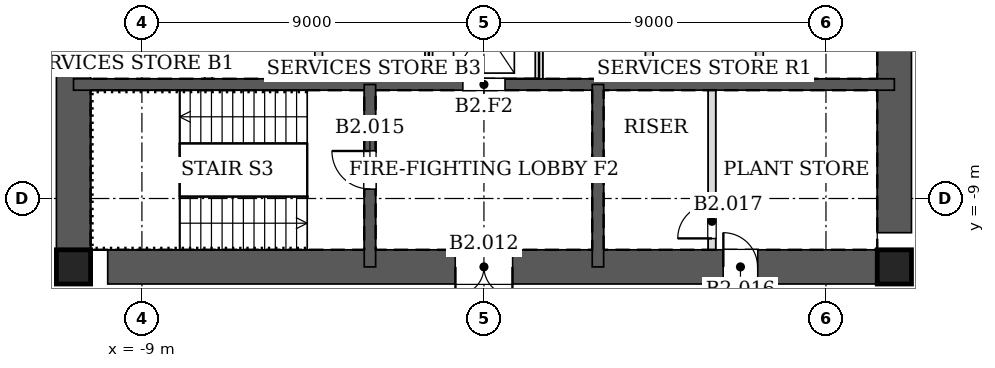
"""IFC4 building model, lengths in metres.
Left out: names, types, materials, properties, quantities, classifications, styles, units other than length and angle.
Written with IfcOpenShell. Run it as: python <this file> out.ifc"""

import sys

from ifc_helpers import new_model, si_unit, direction, frame, frame_2d, origin, origin_2d, place, context, subcontext, project, spatial, rectangle, hollow_rectangle, extrude, element, fill, save


model = new_model("IFC4")
c1 = context("Model", 3, precision=1e-05, world=origin(), true_north=direction((0.0, 1.0)))
c2 = subcontext(c1, "Body", "Model", "MODEL_VIEW")
j1 = project(units=[si_unit("LENGTHUNIT", "METRE"), si_unit("PLANEANGLEUNIT", "RADIAN")], contexts=[c1])
p1 = place(None, origin())
s1 = spatial("IfcSite", under=j1, at=p1, CompositionType="ELEMENT")
p2 = place(p1, origin())
s2 = spatial("IfcBuilding", under=s1, at=p2, CompositionType="ELEMENT")
p3 = place(p2, frame((0.0, 0.0, -9.0)))
s3 = spatial("IfcBuildingStorey", under=s2, at=p3, CompositionType="ELEMENT", Elevation=-9.0)
for number, where, z_axis, x_axis in (
    (1, (-10.8, -10.8, -0.35), (0.0, 0.0, 1.0), (1.0, 0.0, 0.0)),
    (2, (10.8, -10.8, -0.35), (0.0, 0.0, 1.0), (1.0, 0.0, 0.0)),
):
    element("IfcColumn", number, at=place(p3, frame(where, z_axis=z_axis, x_axis=x_axis)), inside=s3, PredefinedType="COLUMN", context=c2, shape_type="SweptSolid", body=[
        extrude(hollow_rectangle(XDim=0.9, YDim=0.9, WallThickness=0.06, at=origin_2d()), origin(), (0.0, 0.0, 1.0), 4.85),
    ])
p4 = place(p3, frame((-10.8, -10.8, -0.35), z_axis=(0.0, 0.0, 1.0), x_axis=(1.0, 0.0, 0.0)))
e3 = element("IfcWall", 3, at=p4, inside=s3, PredefinedType="SOLIDWALL", context=c2, shape_type="SweptSolid", body=[
    extrude(rectangle(XDim=21.6, YDim=0.9, at=frame_2d((10.8, 0.0))), origin(), (0.0, 0.0, 1.0), 4.85),
])
p5 = place(p4, frame((10.05, 0.0, 0.35)))
e4 = element("IfcOpeningElement", 4, at=p5, cuts=e3, PredefinedType="OPENING", context=c2, shape_type="SweptSolid", body=[
    extrude(rectangle(XDim=1.5, YDim=2.1, at=frame_2d((0.75, 1.05))), frame((0.0, 0.46, 0.0), z_axis=(0.0, -1.0, 0.0), x_axis=(1.0, 0.0, 0.0)), (0.0, 0.0, 1.0), 0.92),
])
p6 = place(p4, frame((17.1, 0.0, 0.35)))
e5 = element("IfcOpeningElement", 5, at=p6, cuts=e3, PredefinedType="OPENING", context=c2, shape_type="SweptSolid", body=[
    extrude(rectangle(XDim=0.9, YDim=2.1, at=frame_2d((0.45, 1.05))), frame((0.0, 0.46, 0.0), z_axis=(0.0, -1.0, 0.0), x_axis=(1.0, 0.0, 0.0)), (0.0, 0.0, 1.0), 0.92),
])
p7 = place(p3, frame((10.8, -10.8, -0.35), z_axis=(0.0, 0.0, 1.0), x_axis=(0.0, 1.0, 0.0)))
e6 = element("IfcWall", 6, at=p7, inside=s3, PredefinedType="SOLIDWALL", context=c2, shape_type="SweptSolid", body=[
    extrude(rectangle(XDim=21.6, YDim=0.9, at=frame_2d((10.8, 0.0))), origin(), (0.0, 0.0, 1.0), 4.85),
])
p8 = place(p7, frame((11.7, 0.0, 0.35)))
e7 = element("IfcOpeningElement", 7, at=p8, cuts=e6, PredefinedType="OPENING", context=c2, shape_type="SweptSolid", body=[
    extrude(rectangle(XDim=1.2, YDim=2.1, at=frame_2d((0.6, 1.05))), frame((0.0, 0.46, 0.0), z_axis=(0.0, -1.0, 0.0), x_axis=(1.0, 0.0, 0.0)), (0.0, 0.0, 1.0), 0.92),
])
p9 = place(p7, frame((8.7, 0.0, 0.35)))
e8 = element("IfcOpeningElement", 8, at=p9, cuts=e6, PredefinedType="OPENING", context=c2, shape_type="SweptSolid", body=[
    extrude(rectangle(XDim=1.2, YDim=2.1, at=frame_2d((0.6, 1.05))), frame((0.0, 0.46, 0.0), z_axis=(0.0, -1.0, 0.0), x_axis=(1.0, 0.0, 0.0)), (0.0, 0.0, 1.0), 0.92),
])
p10 = place(p3, frame((-10.8, 10.8, -0.35), z_axis=(0.0, 0.0, 1.0), x_axis=(0.0, -1.0, 0.0)))
e9 = element("IfcWall", 9, at=p10, inside=s3, PredefinedType="SOLIDWALL", context=c2, shape_type="SweptSolid", body=[
    extrude(rectangle(XDim=21.6, YDim=0.9, at=frame_2d((10.8, 0.0))), origin(), (0.0, 0.0, 1.0), 4.85),
])
p11 = place(p10, frame((8.7, 0.0, 0.35)))
e10 = element("IfcOpeningElement", 10, at=p11, cuts=e9, PredefinedType="OPENING", context=c2, shape_type="SweptSolid", body=[
    extrude(rectangle(XDim=1.2, YDim=2.1, at=frame_2d((0.6, 1.05))), frame((0.0, 0.46, 0.0), z_axis=(0.0, -1.0, 0.0), x_axis=(1.0, 0.0, 0.0)), (0.0, 0.0, 1.0), 0.92),
])
p12 = place(p10, frame((11.7, 0.0, 0.35)))
e11 = element("IfcOpeningElement", 11, at=p12, cuts=e9, PredefinedType="OPENING", context=c2, shape_type="SweptSolid", body=[
    extrude(rectangle(XDim=1.2, YDim=2.1, at=frame_2d((0.6, 1.05))), frame((0.0, 0.46, 0.0), z_axis=(0.0, -1.0, 0.0), x_axis=(1.0, 0.0, 0.0)), (0.0, 0.0, 1.0), 0.92),
])
p13 = place(p3, frame((-10.8, -6.0, -0.35), z_axis=(0.0, 0.0, 1.0), x_axis=(1.0, 0.0, 0.0)))
e12 = element("IfcWall", 12, at=p13, inside=s3, PredefinedType="SOLIDWALL", context=c2, shape_type="SweptSolid", body=[
    extrude(rectangle(XDim=21.6, YDim=0.3, at=frame_2d((10.8, 0.0))), origin(), (0.0, 0.0, 1.0), 4.85),
])
p14 = place(p13, frame((10.25, 0.0, 0.35)))
e13 = element("IfcOpeningElement", 13, at=p14, cuts=e12, PredefinedType="OPENING", context=c2, shape_type="SweptSolid", body=[
    extrude(rectangle(XDim=1.1, YDim=2.1, at=frame_2d((0.55, 1.05))), frame((0.0, 0.16, 0.0), z_axis=(0.0, -1.0, 0.0), x_axis=(1.0, 0.0, 0.0)), (0.0, 0.0, 1.0), 0.32),
])
p15 = place(p3, frame((-3.0, -6.0, -0.35), z_axis=(0.0, 0.0, 1.0), x_axis=(0.0, -1.0, 0.0)))
e14 = element("IfcWall", 14, at=p15, inside=s3, PredefinedType="SOLIDWALL", context=c2, shape_type="SweptSolid", body=[
    extrude(rectangle(XDim=4.8, YDim=0.3, at=frame_2d((2.4, 0.0))), origin(), (0.0, 0.0, 1.0), 4.85),
])
p16 = place(p15, frame((1.75, 0.0, 0.35)))
e15 = element("IfcOpeningElement", 15, at=p16, cuts=e14, PredefinedType="OPENING", context=c2, shape_type="SweptSolid", body=[
    extrude(rectangle(XDim=1.0, YDim=2.1, at=frame_2d((0.5, 1.05))), frame((0.0, 0.16, 0.0), z_axis=(0.0, -1.0, 0.0), x_axis=(1.0, 0.0, 0.0)), (0.0, 0.0, 1.0), 0.32),
])
p17 = place(p3, frame((3.0, -6.0, -0.35), z_axis=(0.0, 0.0, 1.0), x_axis=(0.0, -1.0, 0.0)))
e16 = element("IfcWall", 16, at=p17, inside=s3, PredefinedType="SOLIDWALL", context=c2, shape_type="SweptSolid", body=[
    extrude(rectangle(XDim=4.8, YDim=0.3, at=frame_2d((2.4, 0.0))), origin(), (0.0, 0.0, 1.0), 4.85),
])
for number, where, z_axis, x_axis in (
    (17, (-7.25, -5.85, 0.0), (0.0, 0.0, 1.0), (0.0, 1.0, 0.0)),
    (18, (-4.35, -5.85, 0.0), (0.0, 0.0, 1.0), (0.0, 1.0, 0.0)),
    (19, (-1.45, -5.85, 0.0), (0.0, 0.0, 1.0), (0.0, 1.0, 0.0)),
    (20, (1.45, -5.85, 0.0), (0.0, 0.0, 1.0), (0.0, 1.0, 0.0)),
    (21, (4.35, -5.85, 0.0), (0.0, 0.0, 1.0), (0.0, 1.0, 0.0)),
    (22, (7.25, -5.85, 0.0), (0.0, 0.0, 1.0), (0.0, 1.0, 0.0)),
):
    element("IfcWall", number, at=place(p3, frame(where, z_axis=z_axis, x_axis=x_axis)), inside=s3, PredefinedType="PARTITIONING", context=c2, shape_type="SweptSolid", body=[
        extrude(rectangle(XDim=2.7, YDim=0.2, at=frame_2d((1.35, 0.0))), origin(), (0.0, 0.0, 1.0), 4.2),
    ])
p18 = place(p3, frame((6.0, -10.35, 0.0), z_axis=(0.0, 0.0, 1.0), x_axis=(0.0, 1.0, 0.0)))
e23 = element("IfcWall", 23, at=p18, inside=s3, PredefinedType="PARTITIONING", context=c2, shape_type="SweptSolid", body=[
    extrude(rectangle(XDim=4.2, YDim=0.2, at=frame_2d((2.1, 0.0))), origin(), (0.0, 0.0, 1.0), 4.2),
])
p19 = place(p18, frame((0.3, 0.0, 0.0)))
e24 = element("IfcOpeningElement", 24, at=p19, cuts=e23, PredefinedType="OPENING", context=c2, shape_type="SweptSolid", body=[
    extrude(rectangle(XDim=0.9, YDim=2.1, at=frame_2d((0.45, 1.05))), frame((0.0, 0.11, 0.0), z_axis=(0.0, -1.0, 0.0), x_axis=(1.0, 0.0, 0.0)), (0.0, 0.0, 1.0), 0.22),
])
p20 = place(p5, frame((1.5, 0.0, 0.0), z_axis=(0.0, 0.0, 1.0), x_axis=(-1.0, 0.0, 0.0)))
e25 = element("IfcDoor", 25, at=p20, inside=s3, OperationType="DOUBLE_DOOR_SINGLE_SWING", PredefinedType="DOOR", context=c2, shape_type="SweptSolid", body=[
    extrude(rectangle(XDim=1.5, YDim=2.1, at=frame_2d((0.75, 1.05))), frame((0.0, 0.025, 0.0), z_axis=(0.0, -1.0, 0.0), x_axis=(1.0, 0.0, 0.0)), (0.0, 0.0, 1.0), 0.05),
])
fill(e4, e25)
p21 = place(p16, frame((1.0, 0.0, 0.0), z_axis=(0.0, 0.0, 1.0), x_axis=(-1.0, 0.0, 0.0)))
e26 = element("IfcDoor", 26, at=p21, inside=s3, OperationType="SINGLE_SWING_RIGHT", PredefinedType="DOOR", context=c2, shape_type="SweptSolid", body=[
    extrude(rectangle(XDim=1.0, YDim=2.1, at=frame_2d((0.5, 1.05))), frame((0.0, 0.025, 0.0), z_axis=(0.0, -1.0, 0.0), x_axis=(1.0, 0.0, 0.0)), (0.0, 0.0, 1.0), 0.05),
])
fill(e15, e26)
p22 = place(p6, origin())
e27 = element("IfcDoor", 27, at=p22, inside=s3, OperationType="SINGLE_SWING_LEFT", PredefinedType="DOOR", context=c2, shape_type="SweptSolid", body=[
    extrude(rectangle(XDim=0.9, YDim=2.1, at=frame_2d((0.45, 1.05))), frame((0.0, 0.025, 0.0), z_axis=(0.0, -1.0, 0.0), x_axis=(1.0, 0.0, 0.0)), (0.0, 0.0, 1.0), 0.05),
])
fill(e5, e27)
p23 = place(p19, origin())
e28 = element("IfcDoor", 28, at=p23, inside=s3, OperationType="SINGLE_SWING_LEFT", PredefinedType="DOOR", context=c2, shape_type="SweptSolid", body=[
    extrude(rectangle(XDim=0.9, YDim=2.1, at=frame_2d((0.45, 1.05))), frame((0.0, 0.025, 0.0), z_axis=(0.0, -1.0, 0.0), x_axis=(1.0, 0.0, 0.0)), (0.0, 0.0, 1.0), 0.05),
])
fill(e24, e28)
p24 = place(p14, origin())
e29 = element("IfcDoor", 29, at=p24, inside=s3, OperationType="DOUBLE_DOOR_SLIDING", PredefinedType="DOOR", context=c2, shape_type="SweptSolid", body=[
    extrude(rectangle(XDim=1.1, YDim=2.1, at=frame_2d((0.55, 1.05))), frame((0.0, 0.025, 0.0), z_axis=(0.0, -1.0, 0.0), x_axis=(1.0, 0.0, 0.0)), (0.0, 0.0, 1.0), 0.05),
])
fill(e13, e29)
save(model, sys.argv[1])
